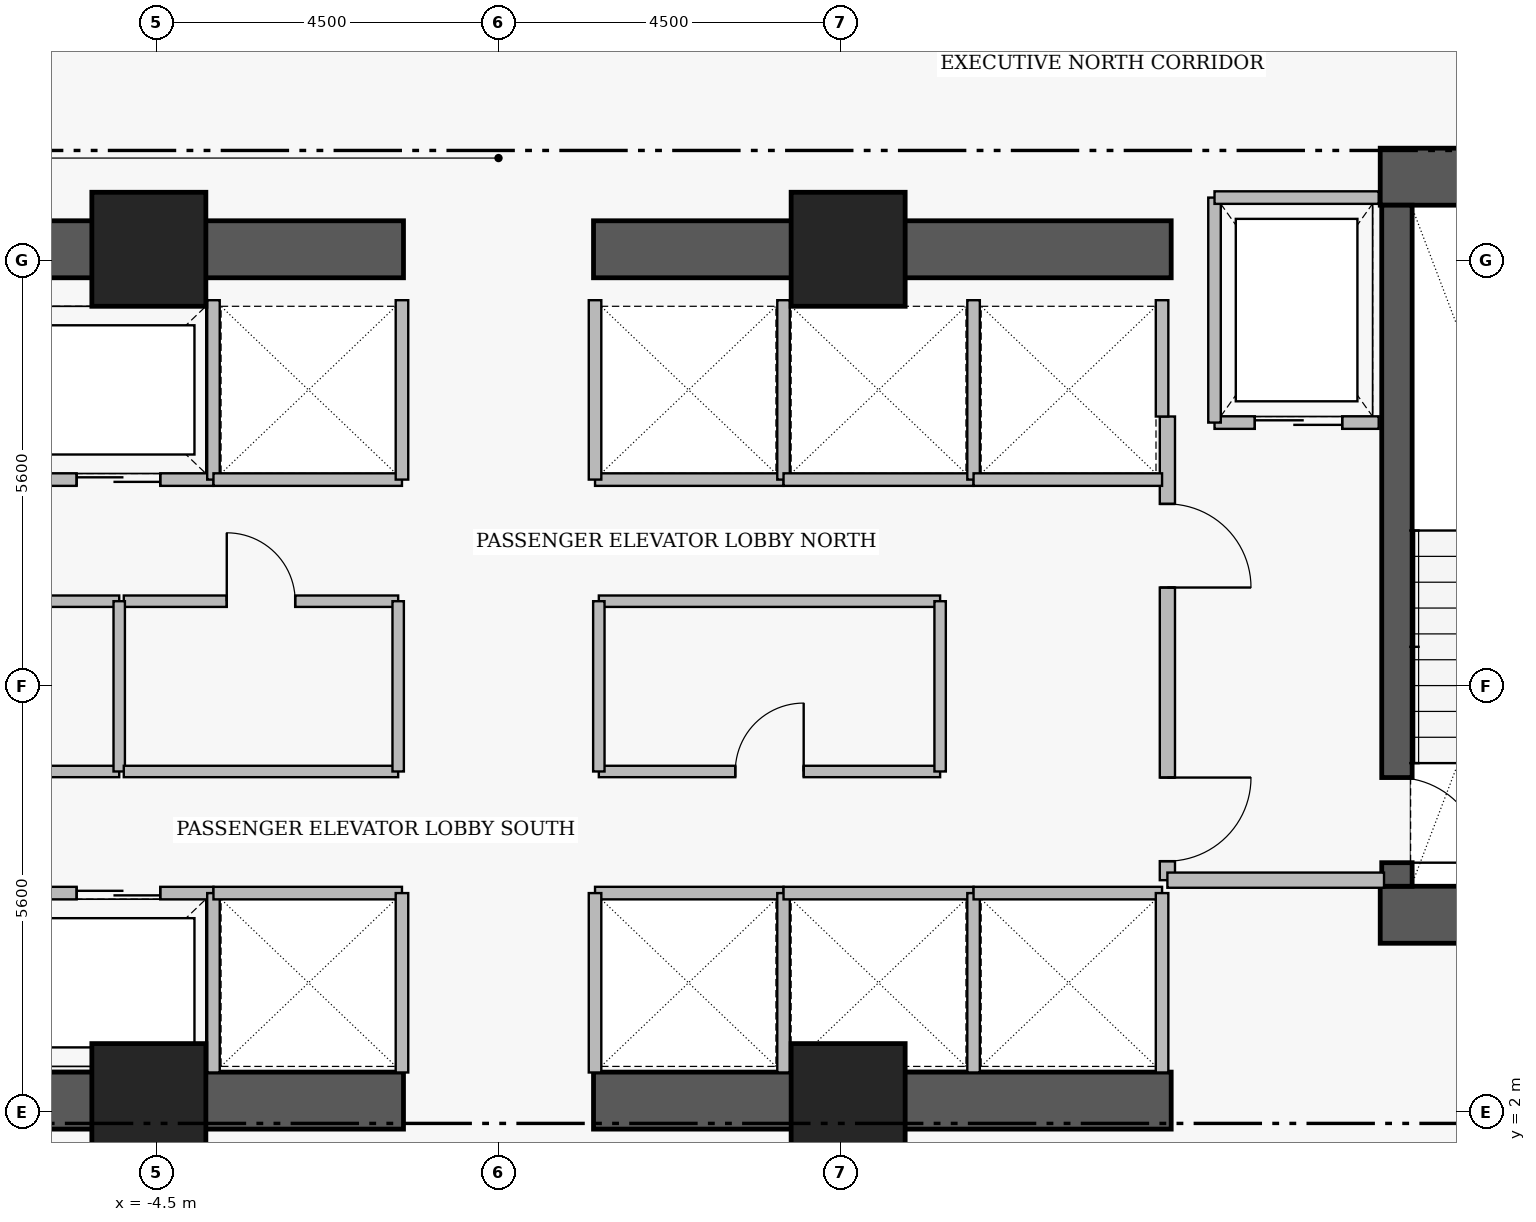
"""IFC4 building model, lengths in metres.
Left out: names, types, materials, properties, quantities, classifications, styles, units other than length and angle.
Written with IfcOpenShell. Run it as: python <this file> out.ifc"""

import sys

from ifc_helpers import new_model, si_unit, direction, frame, frame_2d, origin, origin_2d, place, context, subcontext, project, spatial, rectangle, extrude, element, fill, save


model = new_model("IFC4")
c1 = context("Model", 3, precision=1e-05, world=origin(), true_north=direction((0.0, 1.0)))
c2 = subcontext(c1, "Body", "Model", "MODEL_VIEW")
j1 = project(units=[si_unit("LENGTHUNIT", "METRE"), si_unit("PLANEANGLEUNIT", "RADIAN")], contexts=[c1])
p1 = place(None, origin())
s1 = spatial("IfcSite", under=j1, at=p1, CompositionType="ELEMENT")
p2 = place(p1, origin())
s2 = spatial("IfcBuilding", under=s1, at=p2, CompositionType="ELEMENT")
p3 = place(p2, frame((0.0, 0.0, 139.45)))
s3 = spatial("IfcBuildingStorey", under=s2, at=p3, CompositionType="ELEMENT", Elevation=139.45)
for number, where, z_axis, x_axis in (
    (1, (11.6, 14.305, 0.0), (0.0, 0.0, 1.0), (1.0, 0.0, 0.0)),
    (2, (11.6, 4.595, 0.0), (0.0, 0.0, 1.0), (1.0, 0.0, 0.0)),
):
    element("IfcWall", number, at=place(p3, frame(where, z_axis=z_axis, x_axis=x_axis)), inside=s3, PredefinedType="SHEAR", context=c2, shape_type="SweptSolid", body=[
        extrude(rectangle(XDim=4.56, YDim=0.75, at=frame_2d((2.28, 0.0))), origin(), (0.0, 0.0, 1.0), 3.46),
    ])
for number, where, z_axis, x_axis in (
    (3, (-8.85, 2.15, 0.0), (0.0, 0.0, 1.0), (1.0, 0.0, 0.0)),
    (4, (1.25, 2.15, 0.0), (0.0, 0.0, 1.0), (1.0, 0.0, 0.0)),
    (5, (-8.85, 13.35, 0.0), (0.0, 0.0, 1.0), (1.0, 0.0, 0.0)),
    (6, (1.25, 13.35, 0.0), (0.0, 0.0, 1.0), (1.0, 0.0, 0.0)),
):
    element("IfcWall", number, at=place(p3, frame(where, z_axis=z_axis, x_axis=x_axis)), inside=s3, PredefinedType="SHEAR", context=c2, shape_type="SweptSolid", body=[
        extrude(rectangle(XDim=7.6, YDim=0.75, at=frame_2d((3.8, 0.0))), origin(), (0.0, 0.0, 1.0), 3.43),
    ])
p4 = place(p3, frame((11.82, 13.93, 0.0), z_axis=(0.0, 0.0, 1.0), x_axis=(0.0, -1.0, 0.0)))
e7 = element("IfcWall", 7, at=p4, inside=s3, PredefinedType="SHEAR", context=c2, shape_type="SweptSolid", body=[
    extrude(rectangle(XDim=8.96, YDim=0.4, at=frame_2d((4.48, 0.0))), origin(), (0.0, 0.0, 1.0), 3.46),
])
p5 = place(p4, frame((7.53, 0.0, 0.0)))
e8 = element("IfcOpeningElement", 8, at=p5, cuts=e7, PredefinedType="OPENING", context=c2, shape_type="SweptSolid", body=[
    extrude(rectangle(XDim=1.12, YDim=2.22, at=frame_2d((0.56, 1.11))), frame((0.0, 0.21, 0.0), z_axis=(0.0, -1.0, 0.0), x_axis=(1.0, 0.0, 0.0)), (0.0, 0.0, 1.0), 0.42),
])
for number, where, z_axis, x_axis in (
    (9, (-4.6, 13.35, 0.0), (0.0, 0.0, 1.0), (1.0, 0.0, 0.0)),
    (10, (4.6, 13.35, 0.0), (0.0, 0.0, 1.0), (1.0, 0.0, 0.0)),
    (11, (-4.6, 2.15, 0.0), (0.0, 0.0, 1.0), (1.0, 0.0, 0.0)),
    (12, (4.6, 2.15, 0.0), (0.0, 0.0, 1.0), (1.0, 0.0, 0.0)),
):
    element("IfcColumn", number, at=place(p3, frame(where, z_axis=z_axis, x_axis=x_axis)), inside=s3, PredefinedType="COLUMN", context=c2, shape_type="SweptSolid", body=[
        extrude(rectangle(XDim=1.5, YDim=1.5, at=origin_2d()), origin(), (0.0, 0.0, 1.0), 3.65),
    ])
p6 = place(p3, frame((8.8, 11.15, 0.0), z_axis=(0.0, 0.0, 1.0), x_axis=(0.0, -1.0, 0.0)))
e13 = element("IfcWall", 13, at=p6, inside=s3, PredefinedType="PARTITIONING", context=c2, shape_type="SweptSolid", body=[
    extrude(rectangle(XDim=6.1, YDim=0.2, at=frame_2d((3.05, 0.0))), origin(), (0.0, 0.0, 1.0), 3.43),
])
p7 = place(p6, frame((1.15, 0.0, 0.0)))
e14 = element("IfcOpeningElement", 14, at=p7, cuts=e13, PredefinedType="OPENING", context=c2, shape_type="SweptSolid", body=[
    extrude(rectangle(XDim=1.1, YDim=2.2, at=frame_2d((0.55, 1.1))), frame((0.0, 0.11, 0.0), z_axis=(0.0, -1.0, 0.0), x_axis=(1.0, 0.0, 0.0)), (0.0, 0.0, 1.0), 0.22),
])
p8 = place(p6, frame((4.75, 0.0, 0.0)))
e15 = element("IfcOpeningElement", 15, at=p8, cuts=e13, PredefinedType="OPENING", context=c2, shape_type="SweptSolid", body=[
    extrude(rectangle(XDim=1.1, YDim=2.2, at=frame_2d((0.55, 1.1))), frame((0.0, 0.11, 0.0), z_axis=(0.0, -1.0, 0.0), x_axis=(1.0, 0.0, 0.0)), (0.0, 0.0, 1.0), 0.22),
])
p9 = place(p3, frame((9.42, 11.07, 0.0), z_axis=(0.0, 0.0, 1.0), x_axis=(1.0, 0.0, 0.0)))
e16 = element("IfcWall", 16, at=p9, inside=s3, PredefinedType="PARTITIONING", context=c2, shape_type="SweptSolid", body=[
    extrude(rectangle(XDim=2.16, YDim=0.165, at=frame_2d((1.08, 0.0))), origin(), (0.0, 0.0, 1.0), 3.43),
])
p10 = place(p9, frame((0.53, 0.0, 0.0)))
e17 = element("IfcOpeningElement", 17, at=p10, cuts=e16, PredefinedType="OPENING", context=c2, shape_type="SweptSolid", body=[
    extrude(rectangle(XDim=1.15, YDim=2.25, at=frame_2d((0.575, 1.125))), frame((0.0, 0.093, 0.0), z_axis=(0.0, -1.0, 0.0), x_axis=(1.0, 0.0, 0.0)), (0.0, 0.0, 1.0), 0.185),
])
p11 = place(p3, frame((-6.25, 4.88, 0.0), z_axis=(0.0, 0.0, 1.0), x_axis=(1.0, 0.0, 0.0)))
e18 = element("IfcWall", 18, at=p11, inside=s3, PredefinedType="PARTITIONING", context=c2, shape_type="SweptSolid", body=[
    extrude(rectangle(XDim=2.5, YDim=0.165, at=frame_2d((1.25, 0.0))), origin(), (0.0, 0.0, 1.0), 3.43),
])
p12 = place(p11, frame((0.7, 0.0, 0.0)))
e19 = element("IfcOpeningElement", 19, at=p12, cuts=e18, PredefinedType="OPENING", context=c2, shape_type="SweptSolid", body=[
    extrude(rectangle(XDim=1.1, YDim=2.25, at=frame_2d((0.55, 1.125))), frame((0.0, 0.093, 0.0), z_axis=(0.0, -1.0, 0.0), x_axis=(1.0, 0.0, 0.0)), (0.0, 0.0, 1.0), 0.185),
])
p13 = place(p3, frame((-6.25, 10.32, 0.0), z_axis=(0.0, 0.0, 1.0), x_axis=(1.0, 0.0, 0.0)))
e20 = element("IfcWall", 20, at=p13, inside=s3, PredefinedType="PARTITIONING", context=c2, shape_type="SweptSolid", body=[
    extrude(rectangle(XDim=2.5, YDim=0.165, at=frame_2d((1.25, 0.0))), origin(), (0.0, 0.0, 1.0), 3.43),
])
p14 = place(p13, frame((0.7, 0.0, 0.0)))
e21 = element("IfcOpeningElement", 21, at=p14, cuts=e20, PredefinedType="OPENING", context=c2, shape_type="SweptSolid", body=[
    extrude(rectangle(XDim=1.1, YDim=2.25, at=frame_2d((0.55, 1.125))), frame((0.0, 0.093, 0.0), z_axis=(0.0, -1.0, 0.0), x_axis=(1.0, 0.0, 0.0)), (0.0, 0.0, 1.0), 0.185),
])
p15 = place(p3, frame((-8.61, 6.48, 0.0), z_axis=(0.0, 0.0, 1.0), x_axis=(1.0, 0.0, 0.0)))
e22 = element("IfcWall", 22, at=p15, inside=s3, PredefinedType="PARTITIONING", context=c2, shape_type="SweptSolid", body=[
    extrude(rectangle(XDim=3.62, YDim=0.15, at=frame_2d((1.81, 0.0))), origin(), (0.0, 0.0, 1.0), 3.43),
])
p16 = place(p15, frame((1.36, 0.0, 0.0)))
e23 = element("IfcOpeningElement", 23, at=p16, cuts=e22, PredefinedType="OPENING", context=c2, shape_type="SweptSolid", body=[
    extrude(rectangle(XDim=0.9, YDim=2.15, at=frame_2d((0.45, 1.075))), frame((0.0, 0.085, 0.0), z_axis=(0.0, -1.0, 0.0), x_axis=(1.0, 0.0, 0.0)), (0.0, 0.0, 1.0), 0.17),
])
p17 = place(p3, frame((-4.93, 8.72, 0.0), z_axis=(0.0, 0.0, 1.0), x_axis=(1.0, 0.0, 0.0)))
e24 = element("IfcWall", 24, at=p17, inside=s3, PredefinedType="PARTITIONING", context=c2, shape_type="SweptSolid", body=[
    extrude(rectangle(XDim=3.61, YDim=0.15, at=frame_2d((1.805, 0.0))), origin(), (0.0, 0.0, 1.0), 3.43),
])
p18 = place(p17, frame((1.355, 0.0, 0.0)))
e25 = element("IfcOpeningElement", 25, at=p18, cuts=e24, PredefinedType="OPENING", context=c2, shape_type="SweptSolid", body=[
    extrude(rectangle(XDim=0.9, YDim=2.15, at=frame_2d((0.45, 1.075))), frame((0.0, 0.085, 0.0), z_axis=(0.0, -1.0, 0.0), x_axis=(1.0, 0.0, 0.0)), (0.0, 0.0, 1.0), 0.17),
])
p19 = place(p3, frame((1.32, 6.48, 0.0), z_axis=(0.0, 0.0, 1.0), x_axis=(1.0, 0.0, 0.0)))
e26 = element("IfcWall", 26, at=p19, inside=s3, PredefinedType="PARTITIONING", context=c2, shape_type="SweptSolid", body=[
    extrude(rectangle(XDim=4.49, YDim=0.15, at=frame_2d((2.245, 0.0))), origin(), (0.0, 0.0, 1.0), 3.43),
])
p20 = place(p19, frame((1.795, 0.0, 0.0)))
e27 = element("IfcOpeningElement", 27, at=p20, cuts=e26, PredefinedType="OPENING", context=c2, shape_type="SweptSolid", body=[
    extrude(rectangle(XDim=0.9, YDim=2.15, at=frame_2d((0.45, 1.075))), frame((0.0, 0.085, 0.0), z_axis=(0.0, -1.0, 0.0), x_axis=(1.0, 0.0, 0.0)), (0.0, 0.0, 1.0), 0.17),
])
p21 = place(p3, frame((8.8, 5.05, 0.0), z_axis=(0.0, 0.0, 1.0), x_axis=(1.0, 0.0, 0.0)))
e28 = element("IfcWall", 28, at=p21, inside=s3, PredefinedType="PARTITIONING", context=c2, shape_type="SweptSolid", body=[
    extrude(rectangle(XDim=2.85, YDim=0.2, at=frame_2d((1.425, 0.0))), origin(), (0.0, 0.0, 1.0), 3.43),
])
p22 = place(p3, frame((9.42, 11.07, 0.0), z_axis=(0.0, 0.0, 1.0), x_axis=(0.0, 1.0, 0.0)))
e29 = element("IfcWall", 29, at=p22, inside=s3, PredefinedType="PARTITIONING", context=c2, shape_type="SweptSolid", body=[
    extrude(rectangle(XDim=2.96, YDim=0.165, at=frame_2d((1.48, 0.0))), origin(), (0.0, 0.0, 1.0), 3.43),
])
p23 = place(p3, frame((9.42, 14.03, 0.0), z_axis=(0.0, 0.0, 1.0), x_axis=(1.0, 0.0, 0.0)))
e30 = element("IfcWall", 30, at=p23, inside=s3, PredefinedType="PARTITIONING", context=c2, shape_type="SweptSolid", body=[
    extrude(rectangle(XDim=2.16, YDim=0.165, at=frame_2d((1.08, 0.0))), origin(), (0.0, 0.0, 1.0), 3.43),
])
for number, where, z_axis, x_axis in (
    (31, (-3.75, 2.52, 0.0), (0.0, 0.0, 1.0), (0.0, 1.0, 0.0)),
    (32, (-3.75, 10.32, 0.0), (0.0, 0.0, 1.0), (0.0, 1.0, 0.0)),
):
    element("IfcWall", number, at=place(p3, frame(where, z_axis=z_axis, x_axis=x_axis)), inside=s3, PredefinedType="PARTITIONING", context=c2, shape_type="SweptSolid", body=[
        extrude(rectangle(XDim=2.36, YDim=0.165, at=frame_2d((1.18, 0.0))), origin(), (0.0, 0.0, 1.0), 3.43),
    ])
p24 = place(p3, frame((-3.75, 4.88, 0.0), z_axis=(0.0, 0.0, 1.0), x_axis=(1.0, 0.0, 0.0)))
e33 = element("IfcWall", 33, at=p24, inside=s3, PredefinedType="PARTITIONING", context=c2, shape_type="SweptSolid", body=[
    extrude(rectangle(XDim=2.48, YDim=0.165, at=frame_2d((1.24, 0.0))), origin(), (0.0, 0.0, 1.0), 3.43),
])
p25 = place(p3, frame((-1.27, 2.52, 0.0), z_axis=(0.0, 0.0, 1.0), x_axis=(0.0, 1.0, 0.0)))
e34 = element("IfcWall", 34, at=p25, inside=s3, PredefinedType="PARTITIONING", context=c2, shape_type="SweptSolid", body=[
    extrude(rectangle(XDim=2.36, YDim=0.165, at=frame_2d((1.18, 0.0))), origin(), (0.0, 0.0, 1.0), 3.43),
])
p26 = place(p3, frame((1.27, 4.88, 0.0), z_axis=(0.0, 0.0, 1.0), x_axis=(1.0, 0.0, 0.0)))
e35 = element("IfcWall", 35, at=p26, inside=s3, PredefinedType="PARTITIONING", context=c2, shape_type="SweptSolid", body=[
    extrude(rectangle(XDim=2.48, YDim=0.165, at=frame_2d((1.24, 0.0))), origin(), (0.0, 0.0, 1.0), 3.43),
])
for number, where, z_axis, x_axis in (
    (36, (1.27, 2.52, 0.0), (0.0, 0.0, 1.0), (0.0, 1.0, 0.0)),
    (37, (3.75, 2.52, 0.0), (0.0, 0.0, 1.0), (0.0, 1.0, 0.0)),
):
    element("IfcWall", number, at=place(p3, frame(where, z_axis=z_axis, x_axis=x_axis)), inside=s3, PredefinedType="PARTITIONING", context=c2, shape_type="SweptSolid", body=[
        extrude(rectangle(XDim=2.36, YDim=0.165, at=frame_2d((1.18, 0.0))), origin(), (0.0, 0.0, 1.0), 3.43),
    ])
p27 = place(p3, frame((-3.75, 10.32, 0.0), z_axis=(0.0, 0.0, 1.0), x_axis=(1.0, 0.0, 0.0)))
e38 = element("IfcWall", 38, at=p27, inside=s3, PredefinedType="PARTITIONING", context=c2, shape_type="SweptSolid", body=[
    extrude(rectangle(XDim=2.48, YDim=0.165, at=frame_2d((1.24, 0.0))), origin(), (0.0, 0.0, 1.0), 3.43),
])
p28 = place(p3, frame((-1.27, 10.32, 0.0), z_axis=(0.0, 0.0, 1.0), x_axis=(0.0, 1.0, 0.0)))
e39 = element("IfcWall", 39, at=p28, inside=s3, PredefinedType="PARTITIONING", context=c2, shape_type="SweptSolid", body=[
    extrude(rectangle(XDim=2.36, YDim=0.165, at=frame_2d((1.18, 0.0))), origin(), (0.0, 0.0, 1.0), 3.43),
])
p29 = place(p3, frame((1.27, 10.32, 0.0), z_axis=(0.0, 0.0, 1.0), x_axis=(1.0, 0.0, 0.0)))
e40 = element("IfcWall", 40, at=p29, inside=s3, PredefinedType="PARTITIONING", context=c2, shape_type="SweptSolid", body=[
    extrude(rectangle(XDim=2.48, YDim=0.165, at=frame_2d((1.24, 0.0))), origin(), (0.0, 0.0, 1.0), 3.43),
])
for number, where, z_axis, x_axis in (
    (41, (1.27, 10.32, 0.0), (0.0, 0.0, 1.0), (0.0, 1.0, 0.0)),
    (42, (3.75, 10.32, 0.0), (0.0, 0.0, 1.0), (0.0, 1.0, 0.0)),
):
    element("IfcWall", number, at=place(p3, frame(where, z_axis=z_axis, x_axis=x_axis)), inside=s3, PredefinedType="PARTITIONING", context=c2, shape_type="SweptSolid", body=[
        extrude(rectangle(XDim=2.36, YDim=0.165, at=frame_2d((1.18, 0.0))), origin(), (0.0, 0.0, 1.0), 3.43),
    ])
p30 = place(p3, frame((3.75, 4.88, 0.0), z_axis=(0.0, 0.0, 1.0), x_axis=(1.0, 0.0, 0.0)))
e43 = element("IfcWall", 43, at=p30, inside=s3, PredefinedType="PARTITIONING", context=c2, shape_type="SweptSolid", body=[
    extrude(rectangle(XDim=2.5, YDim=0.165, at=frame_2d((1.25, 0.0))), origin(), (0.0, 0.0, 1.0), 3.43),
])
p31 = place(p3, frame((6.25, 2.52, 0.0), z_axis=(0.0, 0.0, 1.0), x_axis=(0.0, 1.0, 0.0)))
e44 = element("IfcWall", 44, at=p31, inside=s3, PredefinedType="PARTITIONING", context=c2, shape_type="SweptSolid", body=[
    extrude(rectangle(XDim=2.36, YDim=0.165, at=frame_2d((1.18, 0.0))), origin(), (0.0, 0.0, 1.0), 3.43),
])
p32 = place(p3, frame((6.25, 4.88, 0.0), z_axis=(0.0, 0.0, 1.0), x_axis=(1.0, 0.0, 0.0)))
e45 = element("IfcWall", 45, at=p32, inside=s3, PredefinedType="PARTITIONING", context=c2, shape_type="SweptSolid", body=[
    extrude(rectangle(XDim=2.48, YDim=0.165, at=frame_2d((1.24, 0.0))), origin(), (0.0, 0.0, 1.0), 3.43),
])
p33 = place(p3, frame((8.73, 2.52, 0.0), z_axis=(0.0, 0.0, 1.0), x_axis=(0.0, 1.0, 0.0)))
e46 = element("IfcWall", 46, at=p33, inside=s3, PredefinedType="PARTITIONING", context=c2, shape_type="SweptSolid", body=[
    extrude(rectangle(XDim=2.36, YDim=0.165, at=frame_2d((1.18, 0.0))), origin(), (0.0, 0.0, 1.0), 3.43),
])
p34 = place(p3, frame((3.75, 10.32, 0.0), z_axis=(0.0, 0.0, 1.0), x_axis=(1.0, 0.0, 0.0)))
e47 = element("IfcWall", 47, at=p34, inside=s3, PredefinedType="PARTITIONING", context=c2, shape_type="SweptSolid", body=[
    extrude(rectangle(XDim=2.5, YDim=0.165, at=frame_2d((1.25, 0.0))), origin(), (0.0, 0.0, 1.0), 3.43),
])
p35 = place(p3, frame((6.25, 10.32, 0.0), z_axis=(0.0, 0.0, 1.0), x_axis=(0.0, 1.0, 0.0)))
e48 = element("IfcWall", 48, at=p35, inside=s3, PredefinedType="PARTITIONING", context=c2, shape_type="SweptSolid", body=[
    extrude(rectangle(XDim=2.36, YDim=0.165, at=frame_2d((1.18, 0.0))), origin(), (0.0, 0.0, 1.0), 3.43),
])
p36 = place(p3, frame((6.25, 10.32, 0.0), z_axis=(0.0, 0.0, 1.0), x_axis=(1.0, 0.0, 0.0)))
e49 = element("IfcWall", 49, at=p36, inside=s3, PredefinedType="PARTITIONING", context=c2, shape_type="SweptSolid", body=[
    extrude(rectangle(XDim=2.48, YDim=0.165, at=frame_2d((1.24, 0.0))), origin(), (0.0, 0.0, 1.0), 3.43),
])
p37 = place(p3, frame((8.73, 11.15, 0.0), z_axis=(0.0, 0.0, 1.0), x_axis=(0.0, 1.0, 0.0)))
e50 = element("IfcWall", 50, at=p37, inside=s3, PredefinedType="PARTITIONING", context=c2, shape_type="SweptSolid", body=[
    extrude(rectangle(XDim=1.53, YDim=0.165, at=frame_2d((0.765, 0.0))), origin(), (0.0, 0.0, 1.0), 3.43),
])
p38 = place(p3, frame((-8.61, 8.72, 0.0), z_axis=(0.0, 0.0, 1.0), x_axis=(1.0, 0.0, 0.0)))
e51 = element("IfcWall", 51, at=p38, inside=s3, PredefinedType="PARTITIONING", context=c2, shape_type="SweptSolid", body=[
    extrude(rectangle(XDim=3.62, YDim=0.15, at=frame_2d((1.81, 0.0))), origin(), (0.0, 0.0, 1.0), 3.43),
])
p39 = place(p3, frame((-4.99, 6.48, 0.0), z_axis=(0.0, 0.0, 1.0), x_axis=(0.0, 1.0, 0.0)))
e52 = element("IfcWall", 52, at=p39, inside=s3, PredefinedType="PARTITIONING", context=c2, shape_type="SweptSolid", body=[
    extrude(rectangle(XDim=2.24, YDim=0.15, at=frame_2d((1.12, 0.0))), origin(), (0.0, 0.0, 1.0), 3.43),
])
p40 = place(p3, frame((-4.93, 6.48, 0.0), z_axis=(0.0, 0.0, 1.0), x_axis=(1.0, 0.0, 0.0)))
e53 = element("IfcWall", 53, at=p40, inside=s3, PredefinedType="PARTITIONING", context=c2, shape_type="SweptSolid", body=[
    extrude(rectangle(XDim=3.61, YDim=0.15, at=frame_2d((1.805, 0.0))), origin(), (0.0, 0.0, 1.0), 3.43),
])
p41 = place(p3, frame((-1.32, 6.48, 0.0), z_axis=(0.0, 0.0, 1.0), x_axis=(0.0, 1.0, 0.0)))
e54 = element("IfcWall", 54, at=p41, inside=s3, PredefinedType="PARTITIONING", context=c2, shape_type="SweptSolid", body=[
    extrude(rectangle(XDim=2.24, YDim=0.15, at=frame_2d((1.12, 0.0))), origin(), (0.0, 0.0, 1.0), 3.43),
])
p42 = place(p3, frame((1.32, 8.72, 0.0), z_axis=(0.0, 0.0, 1.0), x_axis=(1.0, 0.0, 0.0)))
e55 = element("IfcWall", 55, at=p42, inside=s3, PredefinedType="PARTITIONING", context=c2, shape_type="SweptSolid", body=[
    extrude(rectangle(XDim=4.49, YDim=0.15, at=frame_2d((2.245, 0.0))), origin(), (0.0, 0.0, 1.0), 3.43),
])
for number, where, z_axis, x_axis in (
    (56, (1.32, 6.48, 0.0), (0.0, 0.0, 1.0), (0.0, 1.0, 0.0)),
    (57, (5.81, 6.48, 0.0), (0.0, 0.0, 1.0), (0.0, 1.0, 0.0)),
):
    element("IfcWall", number, at=place(p3, frame(where, z_axis=z_axis, x_axis=x_axis)), inside=s3, PredefinedType="PARTITIONING", context=c2, shape_type="SweptSolid", body=[
        extrude(rectangle(XDim=2.24, YDim=0.15, at=frame_2d((1.12, 0.0))), origin(), (0.0, 0.0, 1.0), 3.43),
    ])
p43 = place(p5, origin())
e58 = element("IfcDoor", 58, at=p43, inside=s3, OperationType="SINGLE_SWING_RIGHT", PredefinedType="DOOR", context=c2, shape_type="SweptSolid", body=[
    extrude(rectangle(XDim=1.12, YDim=2.22, at=frame_2d((0.56, 1.11))), frame((0.0, 0.025, 0.0), z_axis=(0.0, -1.0, 0.0), x_axis=(1.0, 0.0, 0.0)), (0.0, 0.0, 1.0), 0.05),
])
fill(e8, e58)
p44 = place(p7, origin())
e59 = element("IfcDoor", 59, at=p44, inside=s3, OperationType="SINGLE_SWING_RIGHT", PredefinedType="DOOR", context=c2, shape_type="SweptSolid", body=[
    extrude(rectangle(XDim=1.1, YDim=2.2, at=frame_2d((0.55, 1.1))), frame((0.0, 0.025, 0.0), z_axis=(0.0, -1.0, 0.0), x_axis=(1.0, 0.0, 0.0)), (0.0, 0.0, 1.0), 0.05),
])
fill(e14, e59)
p45 = place(p8, origin())
e60 = element("IfcDoor", 60, at=p45, inside=s3, OperationType="SINGLE_SWING_LEFT", PredefinedType="DOOR", context=c2, shape_type="SweptSolid", body=[
    extrude(rectangle(XDim=1.1, YDim=2.2, at=frame_2d((0.55, 1.1))), frame((0.0, 0.025, 0.0), z_axis=(0.0, -1.0, 0.0), x_axis=(1.0, 0.0, 0.0)), (0.0, 0.0, 1.0), 0.05),
])
fill(e15, e60)
p46 = place(p10, origin())
e61 = element("IfcDoor", 61, at=p46, inside=s3, OperationType="SLIDING_TO_LEFT", PredefinedType="DOOR", context=c2, shape_type="SweptSolid", body=[
    extrude(rectangle(XDim=1.15, YDim=2.25, at=frame_2d((0.575, 1.125))), frame((0.0, 0.025, 0.0), z_axis=(0.0, -1.0, 0.0), x_axis=(1.0, 0.0, 0.0)), (0.0, 0.0, 1.0), 0.05),
])
fill(e17, e61)
p47 = place(p12, origin())
e62 = element("IfcDoor", 62, at=p47, inside=s3, OperationType="SLIDING_TO_LEFT", PredefinedType="DOOR", context=c2, shape_type="SweptSolid", body=[
    extrude(rectangle(XDim=1.1, YDim=2.25, at=frame_2d((0.55, 1.125))), frame((0.0, 0.025, 0.0), z_axis=(0.0, -1.0, 0.0), x_axis=(1.0, 0.0, 0.0)), (0.0, 0.0, 1.0), 0.05),
])
fill(e19, e62)
p48 = place(p14, origin())
e63 = element("IfcDoor", 63, at=p48, inside=s3, OperationType="SLIDING_TO_LEFT", PredefinedType="DOOR", context=c2, shape_type="SweptSolid", body=[
    extrude(rectangle(XDim=1.1, YDim=2.25, at=frame_2d((0.55, 1.125))), frame((0.0, 0.025, 0.0), z_axis=(0.0, -1.0, 0.0), x_axis=(1.0, 0.0, 0.0)), (0.0, 0.0, 1.0), 0.05),
])
fill(e21, e63)
p49 = place(p18, origin())
e64 = element("IfcDoor", 64, at=p49, inside=s3, OperationType="SINGLE_SWING_LEFT", PredefinedType="DOOR", context=c2, shape_type="SweptSolid", body=[
    extrude(rectangle(XDim=0.9, YDim=2.15, at=frame_2d((0.45, 1.075))), frame((0.0, 0.025, 0.0), z_axis=(0.0, -1.0, 0.0), x_axis=(1.0, 0.0, 0.0)), (0.0, 0.0, 1.0), 0.05),
])
fill(e25, e64)
p50 = place(p20, origin())
e65 = element("IfcDoor", 65, at=p50, inside=s3, OperationType="SINGLE_SWING_RIGHT", PredefinedType="DOOR", context=c2, shape_type="SweptSolid", body=[
    extrude(rectangle(XDim=0.9, YDim=2.15, at=frame_2d((0.45, 1.075))), frame((0.0, 0.025, 0.0), z_axis=(0.0, -1.0, 0.0), x_axis=(1.0, 0.0, 0.0)), (0.0, 0.0, 1.0), 0.05),
])
fill(e27, e65)
save(model, sys.argv[1])
